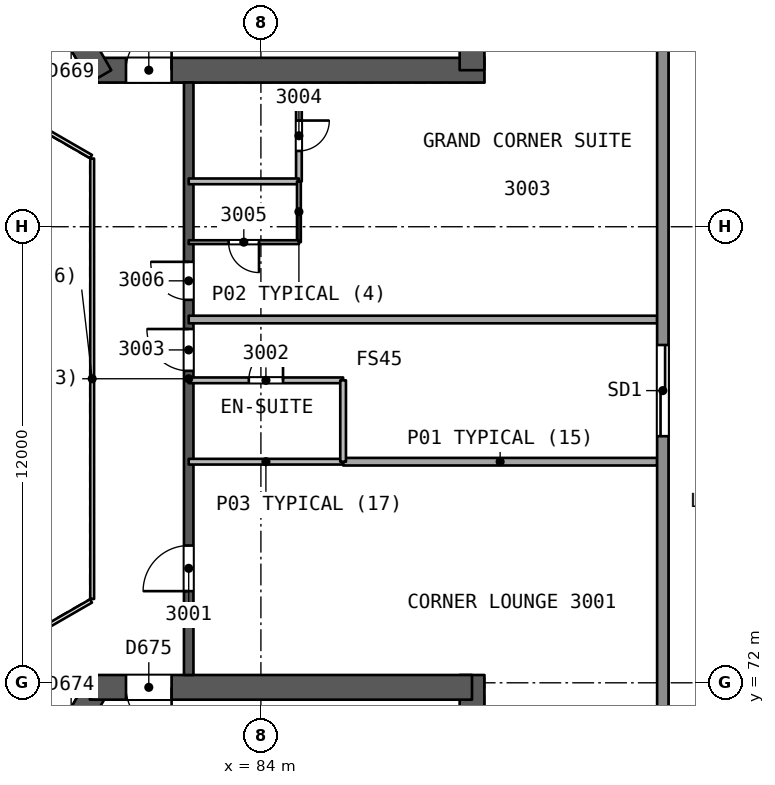
"""IFC4 building model, lengths in metres.
Left out: names, types, materials, properties, quantities, classifications, styles, units other than length and angle.
Written with IfcOpenShell. Run it as: python <this file> out.ifc"""

import sys

from ifc_helpers import new_model, si_unit, direction, frame, frame_2d, origin, place, context, subcontext, project, spatial, rectangle, extrude, element, fill, save


model = new_model("IFC4")
c1 = context("Model", 3, precision=1e-05, world=origin(), true_north=direction((0.0, 1.0)))
c2 = subcontext(c1, "Body", "Model", "MODEL_VIEW")
j1 = project(units=[si_unit("LENGTHUNIT", "METRE"), si_unit("PLANEANGLEUNIT", "RADIAN")], contexts=[c1])
p1 = place(None, origin())
s1 = spatial("IfcSite", under=j1, at=p1, CompositionType="ELEMENT")
p2 = place(p1, origin())
s2 = spatial("IfcBuilding", under=s1, at=p2, CompositionType="ELEMENT")
p3 = place(p2, frame((0.0, 0.0, 125.3)))
s3 = spatial("IfcBuildingStorey", under=s2, at=p3, CompositionType="ELEMENT", Elevation=125.3)
p4 = place(p3, frame((79.688, 88.119, 0.0), z_axis=(0.0, 0.0, 1.0), x_axis=(1.0, 0.0, 0.0)))
e1 = element("IfcWall", 1, at=p4, inside=s3, PredefinedType="SHEAR", context=c2, shape_type="SweptSolid", body=[
    extrude(rectangle(XDim=10.192, YDim=0.65, at=frame_2d((5.096, 0.0))), origin(), (0.0, 0.0, 1.0), 3.7),
])
p5 = place(p4, frame((0.762, 0.0, 0.0)))
e2 = element("IfcOpeningElement", 2, at=p5, cuts=e1, PredefinedType="OPENING", context=c2, shape_type="SweptSolid", body=[
    extrude(rectangle(XDim=1.2, YDim=2.1, at=frame_2d((0.6, 1.05))), frame((0.0, 0.335, 0.0), z_axis=(0.0, -1.0, 0.0), x_axis=(1.0, 0.0, 0.0)), (0.0, 0.0, 1.0), 0.671),
])
p6 = place(p3, frame((89.555, 88.119, 0.0), z_axis=(0.0, 0.0, 1.0), x_axis=(0.0, 1.0, 0.0)))
e3 = element("IfcWall", 3, at=p6, inside=s3, PredefinedType="SHEAR", context=c2, shape_type="SweptSolid", body=[
    extrude(rectangle(XDim=14.009, YDim=0.65, at=frame_2d((7.004, 0.0))), origin(), (0.0, 0.0, 1.0), 3.7),
])
p7 = place(p3, frame((74.754, 96.665, 0.0), z_axis=(0.0, 0.0, 1.0), x_axis=(0.500011799426, -0.866018591275, 0.0)))
e4 = element("IfcWall", 4, at=p7, inside=s3, PredefinedType="SHEAR", context=c2, shape_type="SweptSolid", body=[
    extrude(rectangle(XDim=10.055, YDim=0.65, at=frame_2d((5.027, 0.0))), origin(), (0.0, 0.0, 1.0), 3.7),
])
p8 = place(p7, frame((7.905, 0.0, 0.0)))
e5 = element("IfcOpeningElement", 5, at=p8, cuts=e4, PredefinedType="OPENING", context=c2, shape_type="SweptSolid", body=[
    extrude(rectangle(XDim=1.2, YDim=2.1, at=frame_2d((0.6, 1.05))), frame((0.0, 0.335, 0.0), z_axis=(0.0, -1.0, 0.0), x_axis=(1.0, 0.0, 0.0)), (0.0, 0.0, 1.0), 0.671),
])
p9 = place(p3, frame((79.688, 71.881, 0.0), z_axis=(0.0, 0.0, 1.0), x_axis=(-0.49999822179, -0.866026430432, 0.0)))
e6 = element("IfcWall", 6, at=p9, inside=s3, PredefinedType="SHEAR", context=c2, shape_type="SweptSolid", body=[
    extrude(rectangle(XDim=10.192, YDim=0.65, at=frame_2d((5.096, 0.0))), origin(), (0.0, 0.0, 1.0), 3.7),
])
p10 = place(p9, frame((0.762, 0.0, 0.0)))
e7 = element("IfcOpeningElement", 7, at=p10, cuts=e6, PredefinedType="OPENING", context=c2, shape_type="SweptSolid", body=[
    extrude(rectangle(XDim=1.2, YDim=2.1, at=frame_2d((0.6, 1.05))), frame((0.0, 0.335, 0.0), z_axis=(0.0, -1.0, 0.0), x_axis=(1.0, 0.0, 0.0)), (0.0, 0.0, 1.0), 0.671),
])
p11 = place(p3, frame((89.555, 58.06, 0.0), z_axis=(0.0, 0.0, 1.0), x_axis=(0.0, 1.0, 0.0)))
e8 = element("IfcWall", 8, at=p11, inside=s3, PredefinedType="SHEAR", context=c2, shape_type="SweptSolid", body=[
    extrude(rectangle(XDim=14.146, YDim=0.65, at=frame_2d((7.073, 0.0))), origin(), (0.0, 0.0, 1.0), 3.7),
])
p12 = place(p3, frame((89.555, 71.881, 0.0), z_axis=(0.0, 0.0, 1.0), x_axis=(-1.0, 0.0, 0.0)))
e9 = element("IfcWall", 9, at=p12, inside=s3, PredefinedType="SHEAR", context=c2, shape_type="SweptSolid", body=[
    extrude(rectangle(XDim=10.055, YDim=0.65, at=frame_2d((5.027, 0.0))), origin(), (0.0, 0.0, 1.0), 3.7),
])
p13 = place(p12, frame((7.905, 0.0, 0.0)))
e10 = element("IfcOpeningElement", 10, at=p13, cuts=e9, PredefinedType="OPENING", context=c2, shape_type="SweptSolid", body=[
    extrude(rectangle(XDim=1.2, YDim=2.1, at=frame_2d((0.6, 1.05))), frame((0.0, 0.335, 0.0), z_axis=(0.0, -1.0, 0.0), x_axis=(1.0, 0.0, 0.0)), (0.0, 0.0, 1.0), 0.671),
])
p14 = place(p3, frame((82.1, 72.206, 0.0), z_axis=(0.0, 0.0, 1.0), x_axis=(0.0, 1.0, 0.0)))
e11 = element("IfcWall", 11, at=p14, inside=s3, PredefinedType="SHEAR", context=c2, shape_type="SweptSolid", body=[
    extrude(rectangle(XDim=15.588, YDim=0.25, at=frame_2d((7.794, 0.0))), origin(), (0.0, 0.0, 1.0), 3.25),
])
p15 = place(p14, frame((2.206, 0.0, 0.0)))
e12 = element("IfcOpeningElement", 12, at=p15, cuts=e11, PredefinedType="OPENING", context=c2, shape_type="SweptSolid", body=[
    extrude(rectangle(XDim=1.2, YDim=2.4, at=frame_2d((0.6, 1.2))), frame((0.0, 0.135, 0.0), z_axis=(0.0, -1.0, 0.0), x_axis=(1.0, 0.0, 0.0)), (0.0, 0.0, 1.0), 0.271),
])
p16 = place(p14, frame((8.003, 0.0, 0.0)))
e13 = element("IfcOpeningElement", 13, at=p16, cuts=e11, PredefinedType="OPENING", context=c2, shape_type="SweptSolid", body=[
    extrude(rectangle(XDim=1.1, YDim=2.1, at=frame_2d((0.55, 1.05))), frame((0.0, 0.135, 0.0), z_axis=(0.0, -1.0, 0.0), x_axis=(1.0, 0.0, 0.0)), (0.0, 0.0, 1.0), 0.271),
])
p17 = place(p14, frame((9.871, 0.0, 0.0)))
e14 = element("IfcOpeningElement", 14, at=p17, cuts=e11, PredefinedType="OPENING", context=c2, shape_type="SweptSolid", body=[
    extrude(rectangle(XDim=1.0, YDim=2.1, at=frame_2d((0.5, 1.05))), frame((0.0, 0.135, 0.0), z_axis=(0.0, -1.0, 0.0), x_axis=(1.0, 0.0, 0.0)), (0.0, 0.0, 1.0), 0.271),
])
p18 = place(p3, frame((94.427, 77.818, 0.0), z_axis=(0.0, 0.0, 1.0), x_axis=(-1.0, 0.0, 0.0)))
e15 = element("IfcWall", 15, at=p18, inside=s3, PredefinedType="PARTITIONING", context=c2, shape_type="SweptSolid", body=[
    extrude(rectangle(XDim=8.264, YDim=0.2, at=frame_2d((4.132, 0.0))), origin(), (0.0, 0.0, 1.0), 3.25),
])
p19 = place(p3, frame((86.163, 77.818, 0.0), z_axis=(0.0, 0.0, 1.0), x_axis=(-1.0, 0.0, 0.0)))
e16 = element("IfcWall", 16, at=p19, inside=s3, PredefinedType="PARTITIONING", context=c2, shape_type="SweptSolid", body=[
    extrude(rectangle(XDim=4.063, YDim=0.15, at=frame_2d((2.031, 0.0))), origin(), (0.0, 0.0, 1.0), 3.25),
])
p20 = place(p3, frame((82.1, 79.959, 0.0), z_axis=(0.0, 0.0, 1.0), x_axis=(1.0, 0.0, 0.0)))
e17 = element("IfcWall", 17, at=p20, inside=s3, PredefinedType="PARTITIONING", context=c2, shape_type="SweptSolid", body=[
    extrude(rectangle(XDim=4.063, YDim=0.15, at=frame_2d((2.031, 0.0))), origin(), (0.0, 0.0, 1.0), 3.25),
])
p21 = place(p20, frame((1.582, 0.0, 0.0)))
e18 = element("IfcOpeningElement", 18, at=p21, cuts=e17, PredefinedType="OPENING", context=c2, shape_type="SweptSolid", body=[
    extrude(rectangle(XDim=0.9, YDim=2.1, at=frame_2d((0.45, 1.05))), frame((0.0, 0.085, 0.0), z_axis=(0.0, -1.0, 0.0), x_axis=(1.0, 0.0, 0.0)), (0.0, 0.0, 1.0), 0.171),
])
p22 = place(p3, frame((86.163, 79.959, 0.0), z_axis=(0.0, 0.0, 1.0), x_axis=(0.0, -1.0, 0.0)))
e19 = element("IfcWall", 19, at=p22, inside=s3, PredefinedType="PARTITIONING", context=c2, shape_type="SweptSolid", body=[
    extrude(rectangle(XDim=2.141, YDim=0.15, at=frame_2d((1.071, 0.0))), origin(), (0.0, 0.0, 1.0), 3.25),
])
p23 = place(p3, frame((94.427, 81.559, 0.0), z_axis=(0.0, 0.0, 1.0), x_axis=(-1.0, 0.0, 0.0)))
e20 = element("IfcWall", 20, at=p23, inside=s3, PredefinedType="PARTITIONING", context=c2, shape_type="SweptSolid", body=[
    extrude(rectangle(XDim=12.327, YDim=0.2, at=frame_2d((6.164, 0.0))), origin(), (0.0, 0.0, 1.0), 3.25),
])
p24 = place(p3, frame((85.0, 87.595, 0.0), z_axis=(0.0, 0.0, 1.0), x_axis=(0.0, -1.0, 0.0)))
e21 = element("IfcWall", 21, at=p24, inside=s3, PredefinedType="PARTITIONING", context=c2, shape_type="SweptSolid", body=[
    extrude(rectangle(XDim=2.401, YDim=0.15, at=frame_2d((1.2, 0.0))), origin(), (0.0, 0.0, 1.0), 3.25),
])
p25 = place(p24, frame((0.801, 0.0, 0.0)))
e22 = element("IfcOpeningElement", 22, at=p25, cuts=e21, PredefinedType="OPENING", context=c2, shape_type="SweptSolid", body=[
    extrude(rectangle(XDim=0.8, YDim=2.1, at=frame_2d((0.4, 1.05))), frame((0.0, 0.085, 0.0), z_axis=(0.0, -1.0, 0.0), x_axis=(1.0, 0.0, 0.0)), (0.0, 0.0, 1.0), 0.171),
])
p26 = place(p3, frame((85.0, 85.194, 0.0), z_axis=(0.0, 0.0, 1.0), x_axis=(0.0, -1.0, 0.0)))
e23 = element("IfcWall", 23, at=p26, inside=s3, PredefinedType="PARTITIONING", context=c2, shape_type="SweptSolid", body=[
    extrude(rectangle(XDim=1.6, YDim=0.1, at=frame_2d((0.8, 0.0))), origin(), (0.0, 0.0, 1.0), 3.25),
])
p27 = place(p3, frame((85.0, 83.594, 0.0), z_axis=(0.0, 0.0, 1.0), x_axis=(-1.0, 0.0, 0.0)))
e24 = element("IfcWall", 24, at=p27, inside=s3, PredefinedType="PARTITIONING", context=c2, shape_type="SweptSolid", body=[
    extrude(rectangle(XDim=2.9, YDim=0.1, at=frame_2d((1.45, 0.0))), origin(), (0.0, 0.0, 1.0), 3.25),
])
p28 = place(p27, frame((1.05, 0.0, 0.0)))
e25 = element("IfcOpeningElement", 25, at=p28, cuts=e24, PredefinedType="OPENING", context=c2, shape_type="SweptSolid", body=[
    extrude(rectangle(XDim=0.8, YDim=2.1, at=frame_2d((0.4, 1.05))), frame((0.0, 0.061, 0.0), z_axis=(0.0, -1.0, 0.0), x_axis=(1.0, 0.0, 0.0)), (0.0, 0.0, 1.0), 0.121),
])
p29 = place(p3, frame((82.1, 85.194, 0.0), z_axis=(0.0, 0.0, 1.0), x_axis=(1.0, 0.0, 0.0)))
e26 = element("IfcWall", 26, at=p29, inside=s3, PredefinedType="PARTITIONING", context=c2, shape_type="SweptSolid", body=[
    extrude(rectangle(XDim=2.9, YDim=0.15, at=frame_2d((1.45, 0.0))), origin(), (0.0, 0.0, 1.0), 3.25),
])
p30 = place(p3, frame((94.576, 108.147, 0.0), z_axis=(0.0, 0.0, 1.0), x_axis=(0.0, -1.0, 0.0)))
e27 = element("IfcWall", 27, at=p30, inside=s3, PredefinedType="SOLIDWALL", context=c2, shape_type="SweptSolid", body=[
    extrude(rectangle(XDim=56.293, YDim=0.3, at=frame_2d((28.147, 0.0))), origin(), (0.0, 0.0, 1.0), 3.25),
])
p31 = place(p30, frame((27.259, 0.0, 0.0)))
e28 = element("IfcOpeningElement", 28, at=p31, cuts=e27, PredefinedType="OPENING", context=c2, shape_type="SweptSolid", body=[
    extrude(rectangle(XDim=2.4, YDim=2.4, at=frame_2d((1.2, 1.2))), frame((0.0, 0.161, 0.0), z_axis=(0.0, -1.0, 0.0), x_axis=(1.0, 0.0, 0.0)), (0.0, 0.0, 1.0), 0.321),
])
p32 = place(p30, frame((42.155, 0.0, 0.0)))
e29 = element("IfcOpeningElement", 29, at=p32, cuts=e27, PredefinedType="OPENING", context=c2, shape_type="SweptSolid", body=[
    extrude(rectangle(XDim=2.4, YDim=2.4, at=frame_2d((1.2, 1.2))), frame((0.0, 0.161, 0.0), z_axis=(0.0, -1.0, 0.0), x_axis=(1.0, 0.0, 0.0)), (0.0, 0.0, 1.0), 0.321),
])
p33 = place(p30, frame((12.051, 0.0, 0.0)))
e30 = element("IfcOpeningElement", 30, at=p33, cuts=e27, PredefinedType="OPENING", context=c2, shape_type="SweptSolid", body=[
    extrude(rectangle(XDim=2.4, YDim=2.4, at=frame_2d((1.2, 1.2))), frame((0.0, 0.161, 0.0), z_axis=(0.0, -1.0, 0.0), x_axis=(1.0, 0.0, 0.0)), (0.0, 0.0, 1.0), 0.321),
])
p34 = place(p3, frame((40.836, 82.88, 0.0), z_axis=(0.0, 0.0, 1.0), x_axis=(0.866024964069, 0.500000761609, 0.0)))
e31 = element("IfcWall", 31, at=p34, inside=s3, PredefinedType="SOLIDWALL", context=c2, shape_type="SweptSolid", body=[
    extrude(rectangle(XDim=56.293, YDim=0.3, at=frame_2d((28.147, 0.0))), origin(), (0.0, 0.0, 1.0), 3.25),
])
p35 = place(p34, frame((26.947, 0.0, 0.0)))
e32 = element("IfcOpeningElement", 32, at=p35, cuts=e31, PredefinedType="OPENING", context=c2, shape_type="SweptSolid", body=[
    extrude(rectangle(XDim=2.4, YDim=2.4, at=frame_2d((1.2, 1.2))), frame((0.0, 0.161, 0.0), z_axis=(0.0, -1.0, 0.0), x_axis=(1.0, 0.0, 0.0)), (0.0, 0.0, 1.0), 0.321),
])
p36 = place(p34, frame((32.714, 0.0, 0.0)))
e33 = element("IfcOpeningElement", 33, at=p36, cuts=e31, PredefinedType="OPENING", context=c2, shape_type="SweptSolid", body=[
    extrude(rectangle(XDim=2.4, YDim=2.4, at=frame_2d((1.2, 1.2))), frame((0.0, 0.161, 0.0), z_axis=(0.0, -1.0, 0.0), x_axis=(1.0, 0.0, 0.0)), (0.0, 0.0, 1.0), 0.321),
])
p37 = place(p34, frame((43.711, 0.0, 0.0)))
e34 = element("IfcOpeningElement", 34, at=p37, cuts=e31, PredefinedType="OPENING", context=c2, shape_type="SweptSolid", body=[
    extrude(rectangle(XDim=2.4, YDim=2.4, at=frame_2d((1.2, 1.2))), frame((0.0, 0.161, 0.0), z_axis=(0.0, -1.0, 0.0), x_axis=(1.0, 0.0, 0.0)), (0.0, 0.0, 1.0), 0.321),
])
p38 = place(p34, frame((21.179, 0.0, 0.0)))
e35 = element("IfcOpeningElement", 35, at=p38, cuts=e31, PredefinedType="OPENING", context=c2, shape_type="SweptSolid", body=[
    extrude(rectangle(XDim=2.4, YDim=2.4, at=frame_2d((1.2, 1.2))), frame((0.0, 0.161, 0.0), z_axis=(0.0, -1.0, 0.0), x_axis=(1.0, 0.0, 0.0)), (0.0, 0.0, 1.0), 0.321),
])
p39 = place(p34, frame((10.144, 0.0, 0.0)))
e36 = element("IfcOpeningElement", 36, at=p39, cuts=e31, PredefinedType="OPENING", context=c2, shape_type="SweptSolid", body=[
    extrude(rectangle(XDim=2.4, YDim=2.4, at=frame_2d((1.2, 1.2))), frame((0.0, 0.161, 0.0), z_axis=(0.0, -1.0, 0.0), x_axis=(1.0, 0.0, 0.0)), (0.0, 0.0, 1.0), 0.321),
])
p40 = place(p3, frame((89.588, 48.973, 0.0), z_axis=(0.0, 0.0, 1.0), x_axis=(-0.866024964069, 0.500000761609, 0.0)))
e37 = element("IfcWall", 37, at=p40, inside=s3, PredefinedType="SOLIDWALL", context=c2, shape_type="SweptSolid", body=[
    extrude(rectangle(XDim=56.293, YDim=0.3, at=frame_2d((28.147, 0.0))), origin(), (0.0, 0.0, 1.0), 3.25),
])
p41 = place(p40, frame((42.622, 0.0, 0.0)))
e38 = element("IfcOpeningElement", 38, at=p41, cuts=e37, PredefinedType="OPENING", context=c2, shape_type="SweptSolid", body=[
    extrude(rectangle(XDim=2.4, YDim=2.4, at=frame_2d((1.2, 1.2))), frame((0.0, 0.161, 0.0), z_axis=(0.0, -1.0, 0.0), x_axis=(1.0, 0.0, 0.0)), (0.0, 0.0, 1.0), 0.321),
])
p42 = place(p40, frame((11.895, 0.0, 0.0)))
e39 = element("IfcOpeningElement", 39, at=p42, cuts=e37, PredefinedType="OPENING", context=c2, shape_type="SweptSolid", body=[
    extrude(rectangle(XDim=2.4, YDim=2.4, at=frame_2d((1.2, 1.2))), frame((0.0, 0.161, 0.0), z_axis=(0.0, -1.0, 0.0), x_axis=(1.0, 0.0, 0.0)), (0.0, 0.0, 1.0), 0.321),
])
p43 = place(p40, frame((27.57, 0.0, 0.0)))
e40 = element("IfcOpeningElement", 40, at=p43, cuts=e37, PredefinedType="OPENING", context=c2, shape_type="SweptSolid", body=[
    extrude(rectangle(XDim=2.4, YDim=2.4, at=frame_2d((1.2, 1.2))), frame((0.0, 0.161, 0.0), z_axis=(0.0, -1.0, 0.0), x_axis=(1.0, 0.0, 0.0)), (0.0, 0.0, 1.0), 0.321),
])
p44 = place(p3, frame((79.56, 74.206, 0.0), z_axis=(0.0, 0.0, 1.0), x_axis=(0.0, 1.0, 0.0)))
e41 = element("IfcWall", 41, at=p44, inside=s3, PredefinedType="PARTITIONING", context=c2, shape_type="SweptSolid", body=[
    extrude(rectangle(XDim=11.588, YDim=0.1, at=frame_2d((5.794, 0.0))), origin(), (0.0, 0.0, 1.0), 3.25),
])
for number, where, z_axis, x_axis in (
    (42, (79.53, 85.846, 0.0), (0.0, 0.0, 1.0), (-0.866, 0.5, 0.0)),
    (43, (77.798, 73.154, 0.0), (0.0, 0.0, 1.0), (0.866, 0.5, 0.0)),
):
    element("IfcWall", number, at=place(p3, frame(where, z_axis=z_axis, x_axis=x_axis)), inside=s3, PredefinedType="PARTITIONING", context=c2, shape_type="SweptSolid", body=[
        extrude(rectangle(XDim=2.0, YDim=0.1, at=frame_2d((1.0, 0.0))), origin(), (0.0, 0.0, 1.0), 3.25),
    ])
p45 = place(p15, origin())
e44 = element("IfcDoor", 44, at=p45, inside=s3, OperationType="SINGLE_SWING_LEFT", PredefinedType="NOTDEFINED", context=c2, shape_type="SweptSolid", body=[
    extrude(rectangle(XDim=1.2, YDim=2.4, at=frame_2d((0.6, 1.2))), frame((0.0, 0.025, 0.0), z_axis=(0.0, -1.0, 0.0), x_axis=(1.0, 0.0, 0.0)), (0.0, 0.0, 1.0), 0.05),
])
fill(e12, e44)
p46 = place(p21, origin())
e45 = element("IfcDoor", 45, at=p46, inside=s3, OperationType="SINGLE_SWING_RIGHT", PredefinedType="NOTDEFINED", context=c2, shape_type="SweptSolid", body=[
    extrude(rectangle(XDim=0.9, YDim=2.1, at=frame_2d((0.45, 1.05))), frame((0.0, 0.025, 0.0), z_axis=(0.0, -1.0, 0.0), x_axis=(1.0, 0.0, 0.0)), (0.0, 0.0, 1.0), 0.05),
])
fill(e18, e45)
p47 = place(p16, origin())
e46 = element("IfcDoor", 46, at=p47, inside=s3, OperationType="SINGLE_SWING_RIGHT", PredefinedType="NOTDEFINED", context=c2, shape_type="SweptSolid", body=[
    extrude(rectangle(XDim=1.1, YDim=2.1, at=frame_2d((0.55, 1.05))), frame((0.0, 0.025, 0.0), z_axis=(0.0, -1.0, 0.0), x_axis=(1.0, 0.0, 0.0)), (0.0, 0.0, 1.0), 0.05),
])
fill(e13, e46)
p48 = place(p25, origin())
e47 = element("IfcDoor", 47, at=p48, inside=s3, OperationType="SINGLE_SWING_LEFT", PredefinedType="NOTDEFINED", context=c2, shape_type="SweptSolid", body=[
    extrude(rectangle(XDim=0.8, YDim=2.1, at=frame_2d((0.4, 1.05))), frame((0.0, 0.025, 0.0), z_axis=(0.0, -1.0, 0.0), x_axis=(1.0, 0.0, 0.0)), (0.0, 0.0, 1.0), 0.05),
])
fill(e22, e47)
p49 = place(p28, origin())
e48 = element("IfcDoor", 48, at=p49, inside=s3, OperationType="SINGLE_SWING_LEFT", PredefinedType="NOTDEFINED", context=c2, shape_type="SweptSolid", body=[
    extrude(rectangle(XDim=0.8, YDim=2.1, at=frame_2d((0.4, 1.05))), frame((0.0, 0.025, 0.0), z_axis=(0.0, -1.0, 0.0), x_axis=(1.0, 0.0, 0.0)), (0.0, 0.0, 1.0), 0.05),
])
fill(e25, e48)
p50 = place(p17, origin())
e49 = element("IfcDoor", 49, at=p50, inside=s3, OperationType="SINGLE_SWING_RIGHT", PredefinedType="NOTDEFINED", context=c2, shape_type="SweptSolid", body=[
    extrude(rectangle(XDim=1.0, YDim=2.1, at=frame_2d((0.5, 1.05))), frame((0.0, 0.025, 0.0), z_axis=(0.0, -1.0, 0.0), x_axis=(1.0, 0.0, 0.0)), (0.0, 0.0, 1.0), 0.05),
])
fill(e14, e49)
p51 = place(p31, origin())
e50 = element("IfcDoor", 50, at=p51, inside=s3, OperationType="SLIDING_TO_LEFT", PredefinedType="NOTDEFINED", context=c2, shape_type="SweptSolid", body=[
    extrude(rectangle(XDim=2.4, YDim=2.4, at=frame_2d((1.2, 1.2))), frame((0.0, 0.025, 0.0), z_axis=(0.0, -1.0, 0.0), x_axis=(1.0, 0.0, 0.0)), (0.0, 0.0, 1.0), 0.05),
])
fill(e28, e50)
p52 = place(p5, origin())
e51 = element("IfcDoor", 51, at=p52, inside=s3, OperationType="SINGLE_SWING_RIGHT", PredefinedType="NOTDEFINED", context=c2, shape_type="SweptSolid", body=[
    extrude(rectangle(XDim=1.2, YDim=2.1, at=frame_2d((0.6, 1.05))), frame((0.0, 0.025, 0.0), z_axis=(0.0, -1.0, 0.0), x_axis=(1.0, 0.0, 0.0)), (0.0, 0.0, 1.0), 0.05),
])
fill(e2, e51)
p53 = place(p13, origin())
e52 = element("IfcDoor", 52, at=p53, inside=s3, OperationType="SINGLE_SWING_LEFT", PredefinedType="NOTDEFINED", context=c2, shape_type="SweptSolid", body=[
    extrude(rectangle(XDim=1.2, YDim=2.1, at=frame_2d((0.6, 1.05))), frame((0.0, 0.025, 0.0), z_axis=(0.0, -1.0, 0.0), x_axis=(1.0, 0.0, 0.0)), (0.0, 0.0, 1.0), 0.05),
])
fill(e10, e52)
save(model, sys.argv[1])
